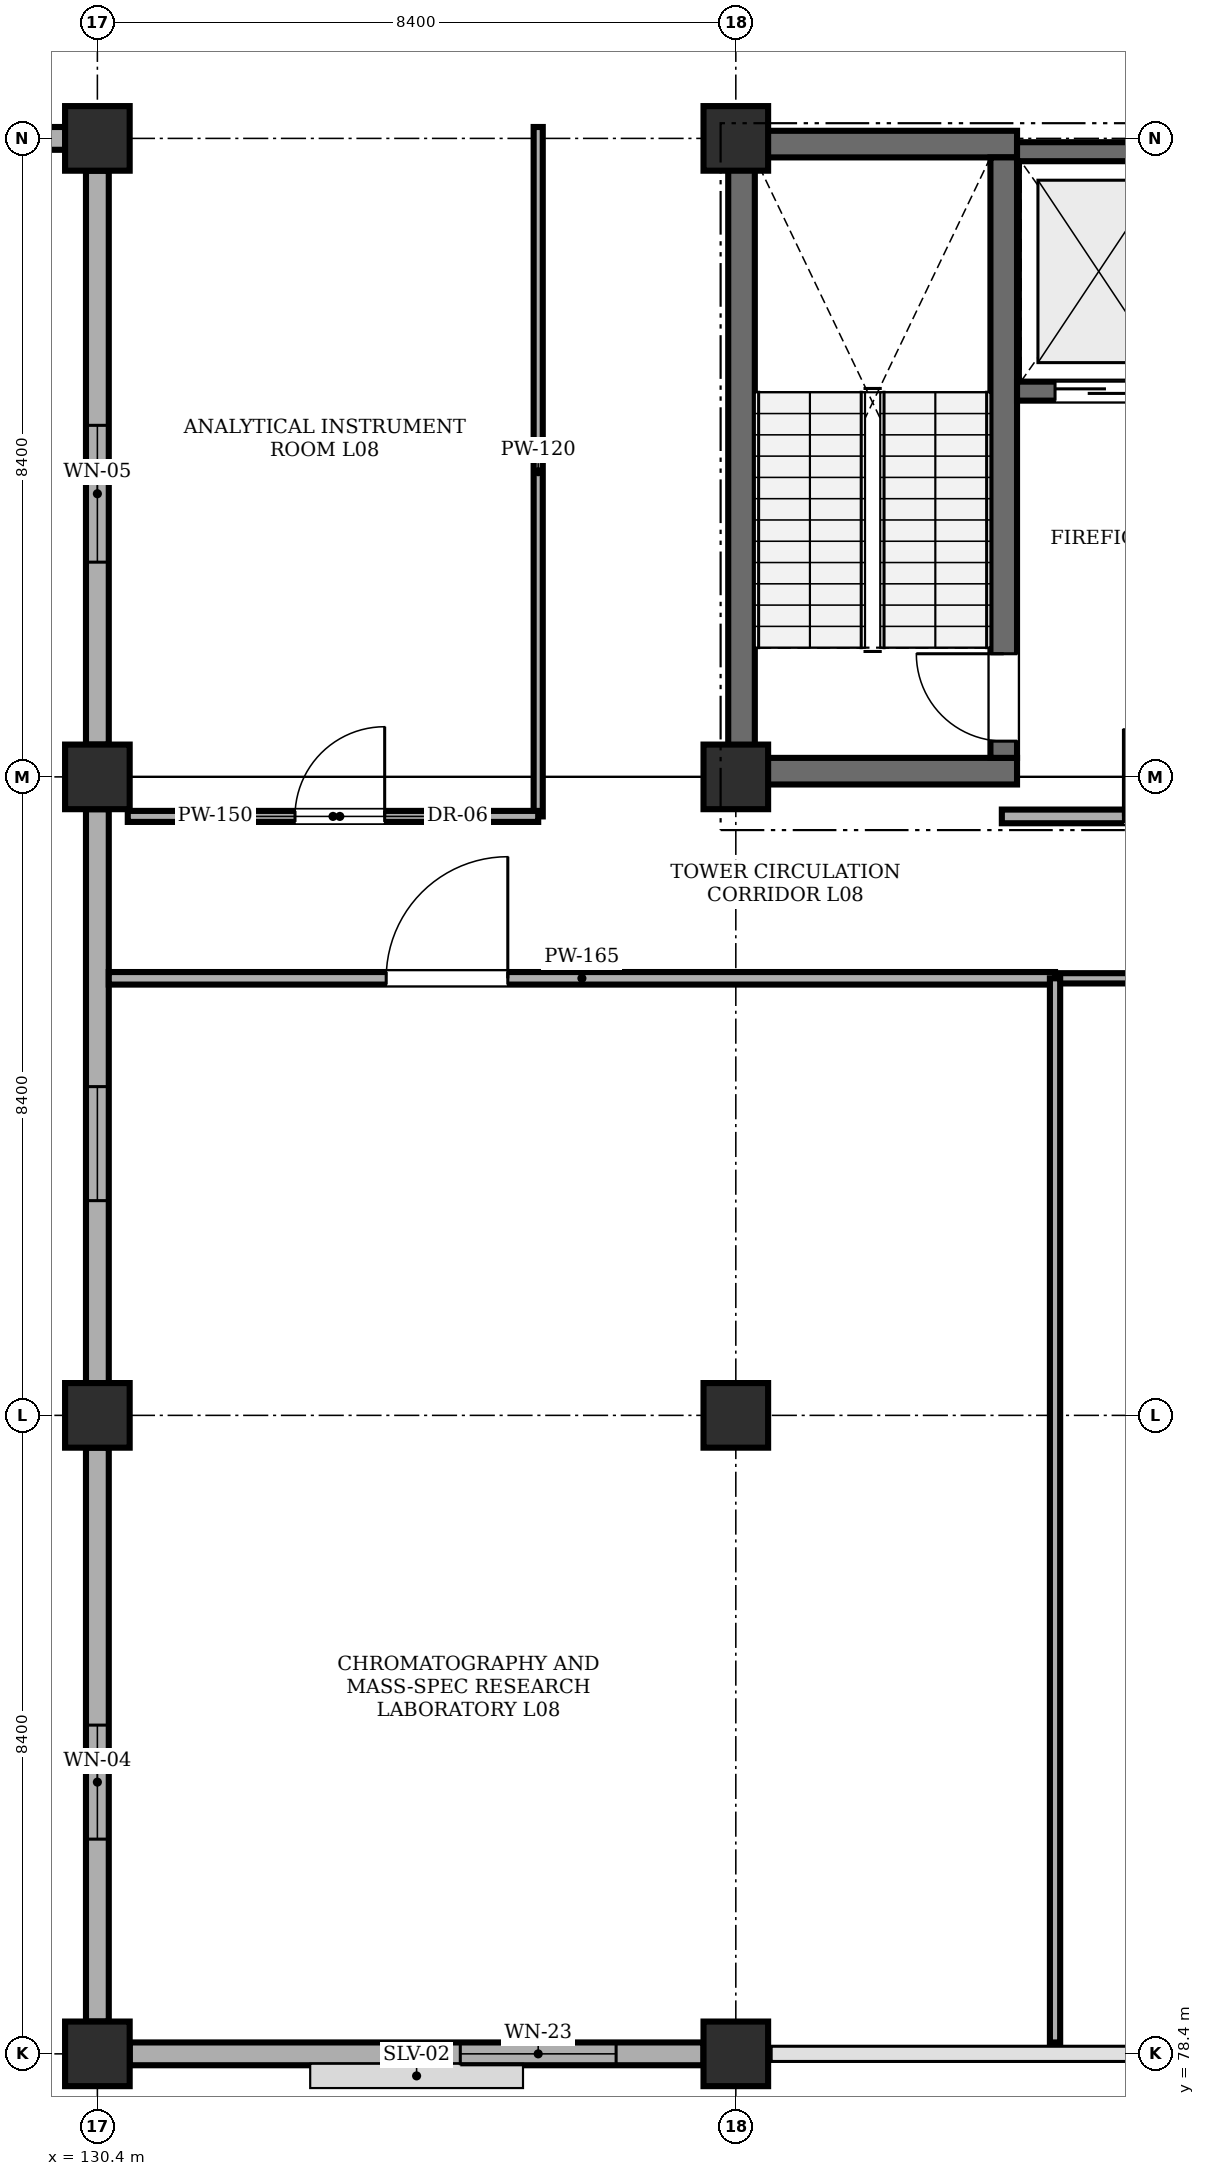
"""IFC4 building model, lengths in metres.
Left out: names, types, materials, properties, quantities, classifications, styles, units other than length and angle.
Written with IfcOpenShell. Run it as: python <this file> out.ifc"""

import sys

from ifc_helpers import new_model, si_unit, direction, frame, frame_2d, origin, origin_2d, place, context, subcontext, project, spatial, rectangle, extrude, element, fill, save


model = new_model("IFC4")
c1 = context("Model", 3, precision=1e-05, world=origin(), true_north=direction((0.0, 1.0)))
c2 = subcontext(c1, "Body", "Model", "MODEL_VIEW")
j1 = project(units=[si_unit("LENGTHUNIT", "METRE"), si_unit("PLANEANGLEUNIT", "RADIAN")], contexts=[c1])
p1 = place(None, origin())
s1 = spatial("IfcSite", under=j1, at=p1, CompositionType="ELEMENT")
p2 = place(p1, origin())
s2 = spatial("IfcBuilding", under=s1, at=p2, CompositionType="ELEMENT")
p3 = place(p2, frame((0.0, 0.0, 31.8)))
s3 = spatial("IfcBuildingStorey", under=s2, at=p3, CompositionType="ELEMENT", Elevation=31.8)
for number, where, z_axis, x_axis in (
    (1, (130.4, 78.4, 0.0), (0.0, 0.0, 1.0), (1.0, 0.0, 0.0)),
    (2, (130.4, 86.8, 0.0), (0.0, 0.0, 1.0), (1.0, 0.0, 0.0)),
    (3, (130.4, 95.2, 0.0), (0.0, 0.0, 1.0), (1.0, 0.0, 0.0)),
    (4, (130.4, 103.6, 0.0), (0.0, 0.0, 1.0), (1.0, 0.0, 0.0)),
    (5, (138.8, 78.4, 0.0), (0.0, 0.0, 1.0), (1.0, 0.0, 0.0)),
    (6, (138.8, 86.8, 0.0), (0.0, 0.0, 1.0), (1.0, 0.0, 0.0)),
    (7, (138.8, 95.2, 0.0), (0.0, 0.0, 1.0), (1.0, 0.0, 0.0)),
    (8, (138.8, 103.6, 0.0), (0.0, 0.0, 1.0), (1.0, 0.0, 0.0)),
):
    element("IfcColumn", number, at=place(p3, frame(where, z_axis=z_axis, x_axis=x_axis)), inside=s3, PredefinedType="COLUMN", context=c2, shape_type="SweptSolid", body=[
        extrude(rectangle(XDim=0.85, YDim=0.85, at=origin_2d()), origin(), (0.0, 0.0, 1.0), 4.02),
    ])
for number, where, z_axis, x_axis in (
    (9, (138.7, 95.275, 0.0), (0.0, 0.0, 1.0), (1.0, 0.0, 0.0)),
    (10, (138.7, 103.525, 0.0), (0.0, 0.0, 1.0), (1.0, 0.0, 0.0)),
):
    element("IfcWall", number, at=place(p3, frame(where, z_axis=z_axis, x_axis=x_axis)), inside=s3, PredefinedType="SHEAR", context=c2, shape_type="SweptSolid", body=[
        extrude(rectangle(XDim=3.8, YDim=0.35, at=frame_2d((1.9, 0.0))), origin(), (0.0, 0.0, 1.0), 4.02),
    ])
p4 = place(p3, frame((138.875, 95.45, 0.0), z_axis=(0.0, 0.0, 1.0), x_axis=(0.0, 1.0, 0.0)))
e11 = element("IfcWall", 11, at=p4, inside=s3, PredefinedType="SHEAR", context=c2, shape_type="SweptSolid", body=[
    extrude(rectangle(XDim=7.9, YDim=0.35, at=frame_2d((3.95, 0.0))), origin(), (0.0, 0.0, 1.0), 4.02),
])
p5 = place(p3, frame((142.325, 95.45, 0.0), z_axis=(0.0, 0.0, 1.0), x_axis=(0.0, 1.0, 0.0)))
e12 = element("IfcWall", 12, at=p5, inside=s3, PredefinedType="SHEAR", context=c2, shape_type="SweptSolid", body=[
    extrude(rectangle(XDim=7.9, YDim=0.35, at=frame_2d((3.95, 0.0))), origin(), (0.0, 0.0, 1.0), 4.02),
])
p6 = place(p5, frame((0.22, 0.0, 0.0)))
e13 = element("IfcOpeningElement", 13, at=p6, cuts=e12, PredefinedType="OPENING", context=c2, shape_type="SweptSolid", body=[
    extrude(rectangle(XDim=1.15, YDim=2.15, at=frame_2d((0.575, 1.075))), frame((0.0, 0.185, 0.0), z_axis=(0.0, -1.0, 0.0), x_axis=(1.0, 0.0, 0.0)), (0.0, 0.0, 1.0), 0.37),
])
p7 = place(p3, frame((142.5, 100.275, 0.0), z_axis=(0.0, 0.0, 1.0), x_axis=(1.0, 0.0, 0.0)))
e14 = element("IfcWall", 14, at=p7, inside=s3, PredefinedType="SHEAR", context=c2, shape_type="SweptSolid", body=[
    extrude(rectangle(XDim=2.1, YDim=0.25, at=frame_2d((1.05, 0.0))), origin(), (0.0, 0.0, 1.0), 4.02),
])
p8 = place(p7, frame((0.5, 0.0, 0.0)))
e15 = element("IfcOpeningElement", 15, at=p8, cuts=e14, PredefinedType="OPENING", context=c2, shape_type="SweptSolid", body=[
    extrude(rectangle(XDim=1.1, YDim=2.15, at=frame_2d((0.55, 1.075))), frame((0.0, 0.135, 0.0), z_axis=(0.0, -1.0, 0.0), x_axis=(1.0, 0.0, 0.0)), (0.0, 0.0, 1.0), 0.27),
])
p9 = place(p3, frame((142.5, 103.425, 0.0), z_axis=(0.0, 0.0, 1.0), x_axis=(1.0, 0.0, 0.0)))
e16 = element("IfcWall", 16, at=p9, inside=s3, PredefinedType="SHEAR", context=c2, shape_type="SweptSolid", body=[
    extrude(rectangle(XDim=2.1, YDim=0.25, at=frame_2d((1.05, 0.0))), origin(), (0.0, 0.0, 1.0), 4.02),
])
p10 = place(p3, frame((138.375, 78.4, 0.0), z_axis=(0.0, 0.0, 1.0), x_axis=(-1.0, 0.0, 0.0)))
e17 = element("IfcWall", 17, at=p10, inside=s3, PredefinedType="STANDARD", context=c2, shape_type="SweptSolid", body=[
    extrude(rectangle(XDim=7.55, YDim=0.3, at=frame_2d((3.775, 0.0))), origin(), (0.0, 0.0, 1.0), 3.32),
])
p11 = place(p10, frame((1.15, 0.0, 0.95)))
e18 = element("IfcOpeningElement", 18, at=p11, cuts=e17, PredefinedType="OPENING", context=c2, shape_type="SweptSolid", body=[
    extrude(rectangle(XDim=2.05, YDim=2.05, at=frame_2d((1.025, 1.025))), frame((0.0, 0.16, 0.0), z_axis=(0.0, -1.0, 0.0), x_axis=(1.0, 0.0, 0.0)), (0.0, 0.0, 1.0), 0.32),
])
p12 = place(p3, frame((130.4, 78.825, 0.0), z_axis=(0.0, 0.0, 1.0), x_axis=(0.0, 1.0, 0.0)))
e19 = element("IfcWall", 19, at=p12, inside=s3, PredefinedType="STANDARD", context=c2, shape_type="SweptSolid", body=[
    extrude(rectangle(XDim=7.55, YDim=0.3, at=frame_2d((3.775, 0.0))), origin(), (0.0, 0.0, 1.0), 3.32),
])
p13 = place(p12, frame((2.4, 0.0, 0.95)))
e20 = element("IfcOpeningElement", 20, at=p13, cuts=e19, PredefinedType="OPENING", context=c2, shape_type="SweptSolid", body=[
    extrude(rectangle(XDim=1.5, YDim=1.8, at=frame_2d((0.75, 0.9))), frame((0.0, 0.16, 0.0), z_axis=(0.0, -1.0, 0.0), x_axis=(1.0, 0.0, 0.0)), (0.0, 0.0, 1.0), 0.32),
])
p14 = place(p3, frame((130.4, 87.225, 0.0), z_axis=(0.0, 0.0, 1.0), x_axis=(0.0, 1.0, 0.0)))
e21 = element("IfcWall", 21, at=p14, inside=s3, PredefinedType="STANDARD", context=c2, shape_type="SweptSolid", body=[
    extrude(rectangle(XDim=7.55, YDim=0.3, at=frame_2d((3.775, 0.0))), origin(), (0.0, 0.0, 1.0), 3.32),
])
p15 = place(p14, frame((2.4, 0.0, 0.95)))
e22 = element("IfcOpeningElement", 22, at=p15, cuts=e21, PredefinedType="OPENING", context=c2, shape_type="SweptSolid", body=[
    extrude(rectangle(XDim=1.5, YDim=1.8, at=frame_2d((0.75, 0.9))), frame((0.0, 0.16, 0.0), z_axis=(0.0, -1.0, 0.0), x_axis=(1.0, 0.0, 0.0)), (0.0, 0.0, 1.0), 0.32),
])
p16 = place(p3, frame((130.4, 95.625, 0.0), z_axis=(0.0, 0.0, 1.0), x_axis=(0.0, 1.0, 0.0)))
e23 = element("IfcWall", 23, at=p16, inside=s3, PredefinedType="STANDARD", context=c2, shape_type="SweptSolid", body=[
    extrude(rectangle(XDim=7.55, YDim=0.3, at=frame_2d((3.775, 0.0))), origin(), (0.0, 0.0, 1.0), 3.32),
])
p17 = place(p16, frame((2.4, 0.0, 1.0)))
e24 = element("IfcOpeningElement", 24, at=p17, cuts=e23, PredefinedType="OPENING", context=c2, shape_type="SweptSolid", body=[
    extrude(rectangle(XDim=1.8, YDim=1.8, at=frame_2d((0.9, 0.9))), frame((0.0, 0.16, 0.0), z_axis=(0.0, -1.0, 0.0), x_axis=(1.0, 0.0, 0.0)), (0.0, 0.0, 1.0), 0.32),
])
p18 = place(p3, frame((129.975, 103.6, 0.0), z_axis=(0.0, 0.0, 1.0), x_axis=(-1.0, 0.0, 0.0)))
e25 = element("IfcWall", 25, at=p18, inside=s3, PredefinedType="STANDARD", context=c2, shape_type="SweptSolid", body=[
    extrude(rectangle(XDim=7.6, YDim=0.3, at=frame_2d((3.8, 0.0))), origin(), (0.0, 0.0, 1.0), 3.32),
])
p19 = place(p3, frame((142.3, 94.68, 0.0), z_axis=(0.0, 0.0, 1.0), x_axis=(1.0, 0.0, 0.0)))
e26 = element("IfcWall", 26, at=p19, inside=s3, PredefinedType="STANDARD", context=c2, shape_type="SweptSolid", body=[
    extrude(rectangle(XDim=4.8, YDim=0.18, at=frame_2d((2.4, 0.0))), origin(), (0.0, 0.0, 1.0), 4.02),
])
p20 = place(p19, frame((1.6, 0.0, 0.0)))
e27 = element("IfcOpeningElement", 27, at=p20, cuts=e26, PredefinedType="OPENING", context=c2, shape_type="SweptSolid", body=[
    extrude(rectangle(XDim=1.15, YDim=2.15, at=frame_2d((0.575, 1.075))), frame((0.0, 0.1, 0.0), z_axis=(0.0, -1.0, 0.0), x_axis=(1.0, 0.0, 0.0)), (0.0, 0.0, 1.0), 0.2),
])
p21 = place(p3, frame((136.2, 94.68, 0.0), z_axis=(0.0, 0.0, 1.0), x_axis=(0.0, 1.0, 0.0)))
e28 = element("IfcWall", 28, at=p21, inside=s3, PredefinedType="PARTITIONING", context=c2, shape_type="SweptSolid", body=[
    extrude(rectangle(XDim=9.07, YDim=0.12, at=frame_2d((4.535, 0.0))), origin(), (0.0, 0.0, 1.0), 4.02),
])
p22 = place(p3, frame((130.8, 94.68, 0.0), z_axis=(0.0, 0.0, 1.0), x_axis=(1.0, 0.0, 0.0)))
e29 = element("IfcWall", 29, at=p22, inside=s3, PredefinedType="PARTITIONING", context=c2, shape_type="SweptSolid", body=[
    extrude(rectangle(XDim=5.4, YDim=0.145, at=frame_2d((2.7, 0.0))), origin(), (0.0, 0.0, 1.0), 4.02),
])
p23 = place(p22, frame((2.2, 0.0, 0.0)))
e30 = element("IfcOpeningElement", 30, at=p23, cuts=e29, PredefinedType="OPENING", context=c2, shape_type="SweptSolid", body=[
    extrude(rectangle(XDim=1.18, YDim=2.18, at=frame_2d((0.59, 1.09))), frame((0.0, 0.083, 0.0), z_axis=(0.0, -1.0, 0.0), x_axis=(1.0, 0.0, 0.0)), (0.0, 0.0, 1.0), 0.165),
])
p24 = place(p3, frame((130.55, 92.55, 0.0), z_axis=(0.0, 0.0, 1.0), x_axis=(1.0, 0.0, 0.0)))
e31 = element("IfcWall", 31, at=p24, inside=s3, PredefinedType="PARTITIONING", context=c2, shape_type="SweptSolid", body=[
    extrude(rectangle(XDim=12.45, YDim=0.165, at=frame_2d((6.225, 0.0))), origin(), (0.0, 0.0, 1.0), 4.02),
])
p25 = place(p24, frame((3.65, 0.0, 0.0)))
e32 = element("IfcOpeningElement", 32, at=p25, cuts=e31, PredefinedType="OPENING", context=c2, shape_type="SweptSolid", body=[
    extrude(rectangle(XDim=1.6, YDim=2.24, at=frame_2d((0.8, 1.12))), frame((0.0, 0.093, 0.0), z_axis=(0.0, -1.0, 0.0), x_axis=(1.0, 0.0, 0.0)), (0.0, 0.0, 1.0), 0.185),
])
p26 = place(p3, frame((143.0, 92.55, 0.0), z_axis=(0.0, 0.0, 1.0), x_axis=(1.0, 0.0, 0.0)))
e33 = element("IfcWall", 33, at=p26, inside=s3, PredefinedType="PARTITIONING", context=c2, shape_type="SweptSolid", body=[
    extrude(rectangle(XDim=12.6, YDim=0.135, at=frame_2d((6.3, 0.0))), origin(), (0.0, 0.0, 1.0), 4.02),
])
p27 = place(p26, frame((6.8, 0.0, 0.0)))
e34 = element("IfcOpeningElement", 34, at=p27, cuts=e33, PredefinedType="OPENING", context=c2, shape_type="SweptSolid", body=[
    extrude(rectangle(XDim=1.08, YDim=2.15, at=frame_2d((0.54, 1.075))), frame((0.0, 0.077, 0.0), z_axis=(0.0, -1.0, 0.0), x_axis=(1.0, 0.0, 0.0)), (0.0, 0.0, 1.0), 0.155),
])
p28 = place(p3, frame((143.0, 78.55, 0.0), z_axis=(0.0, 0.0, 1.0), x_axis=(0.0, 1.0, 0.0)))
e35 = element("IfcWall", 35, at=p28, inside=s3, PredefinedType="PARTITIONING", context=c2, shape_type="SweptSolid", body=[
    extrude(rectangle(XDim=14.0, YDim=0.135, at=frame_2d((7.0, 0.0))), origin(), (0.0, 0.0, 1.0), 3.52),
])
p29 = place(p11, origin())
e36 = element("IfcWindow", 36, at=p29, inside=s3, PartitioningType="DOUBLE_PANEL_VERTICAL", PredefinedType="WINDOW", context=c2, shape_type="SweptSolid", body=[
    extrude(rectangle(XDim=2.05, YDim=2.05, at=frame_2d((1.025, 1.025))), frame((0.0, 0.03, 0.0), z_axis=(0.0, -1.0, 0.0), x_axis=(1.0, 0.0, 0.0)), (0.0, 0.0, 1.0), 0.06),
])
fill(e18, e36)
p30 = place(p13, origin())
e37 = element("IfcWindow", 37, at=p30, inside=s3, PartitioningType="DOUBLE_PANEL_VERTICAL", PredefinedType="WINDOW", context=c2, shape_type="SweptSolid", body=[
    extrude(rectangle(XDim=1.5, YDim=1.8, at=frame_2d((0.75, 0.9))), frame((0.0, 0.03, 0.0), z_axis=(0.0, -1.0, 0.0), x_axis=(1.0, 0.0, 0.0)), (0.0, 0.0, 1.0), 0.06),
])
fill(e20, e37)
p31 = place(p15, origin())
e38 = element("IfcWindow", 38, at=p31, inside=s3, PartitioningType="DOUBLE_PANEL_VERTICAL", PredefinedType="WINDOW", context=c2, shape_type="SweptSolid", body=[
    extrude(rectangle(XDim=1.5, YDim=1.8, at=frame_2d((0.75, 0.9))), frame((0.0, 0.03, 0.0), z_axis=(0.0, -1.0, 0.0), x_axis=(1.0, 0.0, 0.0)), (0.0, 0.0, 1.0), 0.06),
])
fill(e22, e38)
p32 = place(p17, origin())
e39 = element("IfcWindow", 39, at=p32, inside=s3, PartitioningType="DOUBLE_PANEL_VERTICAL", PredefinedType="WINDOW", context=c2, shape_type="SweptSolid", body=[
    extrude(rectangle(XDim=1.8, YDim=1.8, at=frame_2d((0.9, 0.9))), frame((0.0, 0.03, 0.0), z_axis=(0.0, -1.0, 0.0), x_axis=(1.0, 0.0, 0.0)), (0.0, 0.0, 1.0), 0.06),
])
fill(e24, e39)
p33 = place(p20, origin())
e40 = element("IfcDoor", 40, at=p33, inside=s3, OperationType="SINGLE_SWING_LEFT", PredefinedType="DOOR", context=c2, shape_type="SweptSolid", body=[
    extrude(rectangle(XDim=1.15, YDim=2.15, at=frame_2d((0.575, 1.075))), frame((0.0, 0.025, 0.0), z_axis=(0.0, -1.0, 0.0), x_axis=(1.0, 0.0, 0.0)), (0.0, 0.0, 1.0), 0.05),
])
fill(e27, e40)
p34 = place(p23, origin())
e41 = element("IfcDoor", 41, at=p34, inside=s3, OperationType="SINGLE_SWING_RIGHT", PredefinedType="DOOR", context=c2, shape_type="SweptSolid", body=[
    extrude(rectangle(XDim=1.18, YDim=2.18, at=frame_2d((0.59, 1.09))), frame((0.0, 0.025, 0.0), z_axis=(0.0, -1.0, 0.0), x_axis=(1.0, 0.0, 0.0)), (0.0, 0.0, 1.0), 0.05),
])
fill(e30, e41)
p35 = place(p25, origin())
e42 = element("IfcDoor", 42, at=p35, inside=s3, OperationType="SINGLE_SWING_RIGHT", PredefinedType="DOOR", context=c2, shape_type="SweptSolid", body=[
    extrude(rectangle(XDim=1.6, YDim=2.24, at=frame_2d((0.8, 1.12))), frame((0.0, 0.025, 0.0), z_axis=(0.0, -1.0, 0.0), x_axis=(1.0, 0.0, 0.0)), (0.0, 0.0, 1.0), 0.05),
])
fill(e32, e42)
p36 = place(p6, origin())
e43 = element("IfcDoor", 43, at=p36, inside=s3, OperationType="SINGLE_SWING_RIGHT", PredefinedType="DOOR", context=c2, shape_type="SweptSolid", body=[
    extrude(rectangle(XDim=1.15, YDim=2.15, at=frame_2d((0.575, 1.075))), frame((0.0, 0.025, 0.0), z_axis=(0.0, -1.0, 0.0), x_axis=(1.0, 0.0, 0.0)), (0.0, 0.0, 1.0), 0.05),
])
fill(e13, e43)
p37 = place(p8, origin())
e44 = element("IfcDoor", 44, at=p37, inside=s3, OperationType="SLIDING_TO_LEFT", PredefinedType="DOOR", context=c2, shape_type="SweptSolid", body=[
    extrude(rectangle(XDim=1.1, YDim=2.15, at=frame_2d((0.55, 1.075))), frame((0.0, 0.025, 0.0), z_axis=(0.0, -1.0, 0.0), x_axis=(1.0, 0.0, 0.0)), (0.0, 0.0, 1.0), 0.05),
])
fill(e15, e44)
save(model, sys.argv[1])
